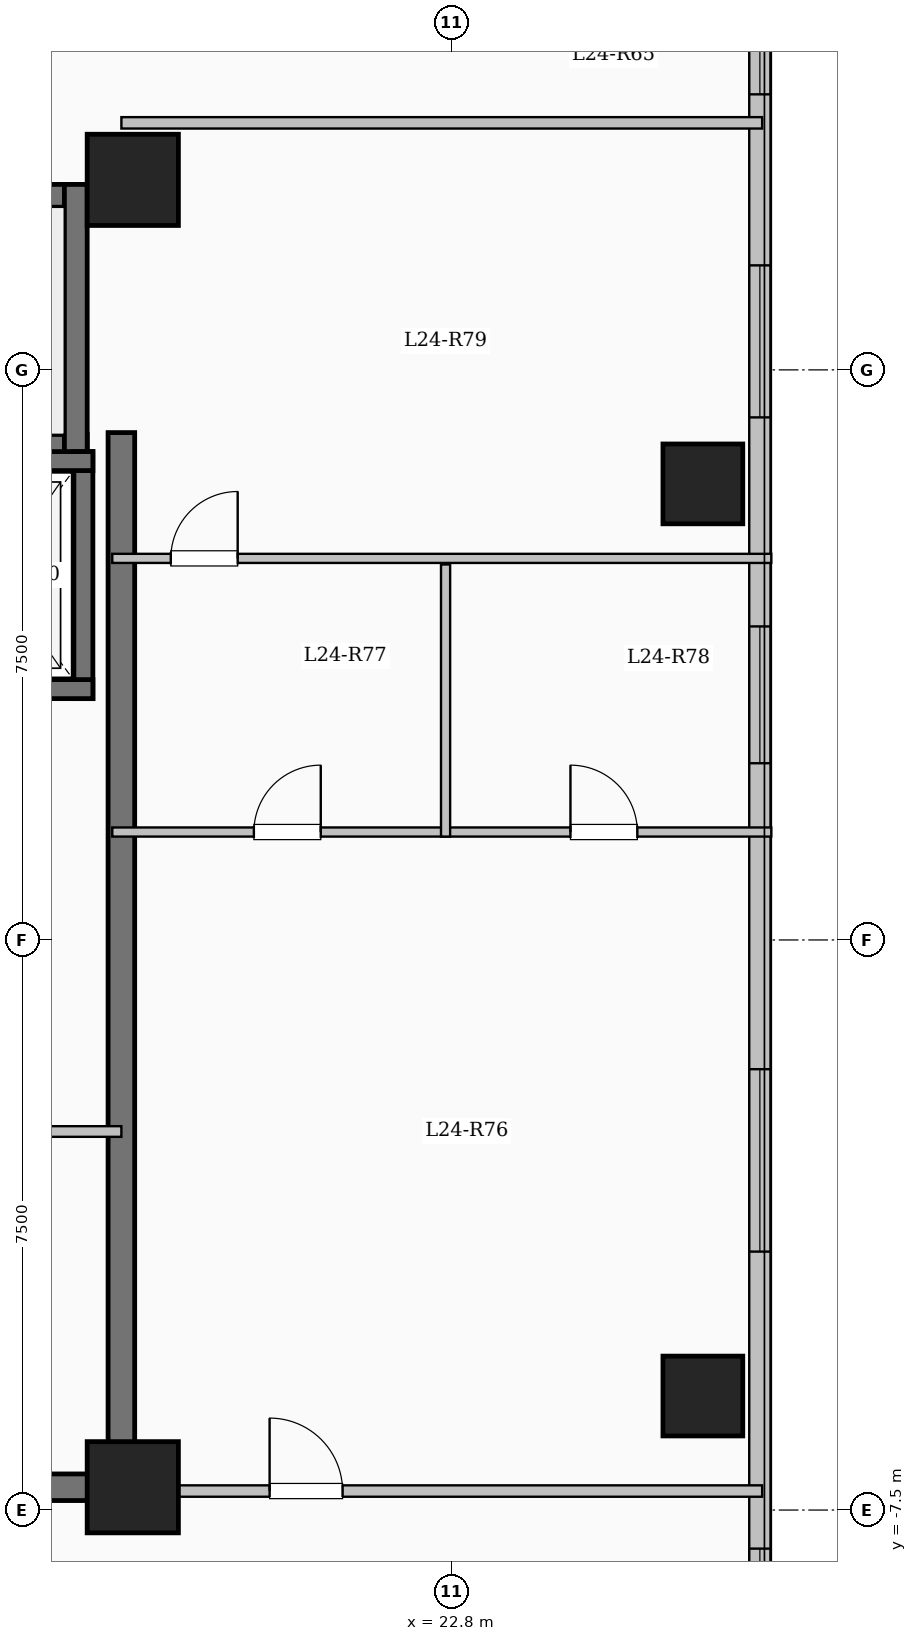
"""IFC4 building model, lengths in metres.
Left out: names, types, materials, properties, quantities, classifications, styles, units other than length and angle.
Written with IfcOpenShell. Run it as: python <this file> out.ifc"""

import sys

from ifc_helpers import new_model, si_unit, direction, frame, frame_2d, origin, origin_2d, place, context, subcontext, project, spatial, rectangle, extrude, element, fill, save


model = new_model("IFC4")
c1 = context("Model", 3, precision=1e-05, world=origin(), true_north=direction((0.0, 1.0)))
c2 = subcontext(c1, "Body", "Model", "MODEL_VIEW")
j1 = project(units=[si_unit("LENGTHUNIT", "METRE"), si_unit("PLANEANGLEUNIT", "RADIAN")], contexts=[c1])
p1 = place(None, origin())
s1 = spatial("IfcSite", under=j1, at=p1, CompositionType="ELEMENT")
p2 = place(p1, origin())
s2 = spatial("IfcBuilding", under=s1, at=p2, CompositionType="ELEMENT")
p3 = place(p2, frame((0.0, 0.0, 91.7)))
s3 = spatial("IfcBuildingStorey", under=s2, at=p3, CompositionType="ELEMENT", Elevation=91.7)
for number, where, z_axis, x_axis in (
    (1, (18.6, -7.2, 0.0), (0.0, 0.0, 1.0), (1.0, 0.0, 0.0)),
    (2, (18.6, 10.0, 0.0), (0.0, 0.0, 1.0), (1.0, 0.0, 0.0)),
):
    element("IfcColumn", number, at=place(p3, frame(where, z_axis=z_axis, x_axis=x_axis)), inside=s3, PredefinedType="COLUMN", context=c2, shape_type="SweptSolid", body=[
        extrude(rectangle(XDim=1.2, YDim=1.2, at=origin_2d()), origin(), (0.0, 0.0, 1.0), 3.35),
    ])
for number, where, z_axis, x_axis in (
    (3, (26.1, -6.0, 0.0), (0.0, 0.0, 1.0), (1.0, 0.0, 0.0)),
    (4, (26.1, 6.0, 0.0), (0.0, 0.0, 1.0), (1.0, 0.0, 0.0)),
):
    element("IfcColumn", number, at=place(p3, frame(where, z_axis=z_axis, x_axis=x_axis)), inside=s3, PredefinedType="COLUMN", context=c2, shape_type="SweptSolid", body=[
        extrude(rectangle(XDim=1.05, YDim=1.05, at=origin_2d()), origin(), (0.0, 0.0, 1.0), 3.35),
    ])
p4 = place(p3, frame((26.85, 17.85, 0.0), z_axis=(0.0, 0.0, 1.0), x_axis=(0.0, -1.0, 0.0)))
e5 = element("IfcWall", 5, at=p4, inside=s3, PredefinedType="SOLIDWALL", context=c2, shape_type="SweptSolid", body=[
    extrude(rectangle(XDim=35.7, YDim=0.28, at=frame_2d((17.85, 0.0))), origin(), (0.0, 0.0, 1.0), 3.1),
])
p5 = place(p4, frame((1.675, 0.0, 0.9)))
e6 = element("IfcOpeningElement", 6, at=p5, cuts=e5, PredefinedType="OPENING", context=c2, shape_type="SweptSolid", body=[
    extrude(rectangle(XDim=2.0, YDim=1.7, at=frame_2d((1.0, 0.85))), frame((0.0, 0.15, 0.0), z_axis=(0.0, -1.0, 0.0), x_axis=(1.0, 0.0, 0.0)), (0.0, 0.0, 1.0), 0.3),
])
p6 = place(p4, frame((5.725, 0.0, 0.95)))
e7 = element("IfcOpeningElement", 7, at=p6, cuts=e5, PredefinedType="OPENING", context=c2, shape_type="SweptSolid", body=[
    extrude(rectangle(XDim=1.0, YDim=1.5, at=frame_2d((0.5, 0.75))), frame((0.0, 0.15, 0.0), z_axis=(0.0, -1.0, 0.0), x_axis=(1.0, 0.0, 0.0)), (0.0, 0.0, 1.0), 0.3),
])
p7 = place(p4, frame((8.975, 0.0, 0.9)))
e8 = element("IfcOpeningElement", 8, at=p7, cuts=e5, PredefinedType="OPENING", context=c2, shape_type="SweptSolid", body=[
    extrude(rectangle(XDim=2.0, YDim=1.7, at=frame_2d((1.0, 0.85))), frame((0.0, 0.15, 0.0), z_axis=(0.0, -1.0, 0.0), x_axis=(1.0, 0.0, 0.0)), (0.0, 0.0, 1.0), 0.3),
])
p8 = place(p4, frame((13.725, 0.0, 0.9)))
e9 = element("IfcOpeningElement", 9, at=p8, cuts=e5, PredefinedType="OPENING", context=c2, shape_type="SweptSolid", body=[
    extrude(rectangle(XDim=1.8, YDim=1.65, at=frame_2d((0.9, 0.825))), frame((0.0, 0.15, 0.0), z_axis=(0.0, -1.0, 0.0), x_axis=(1.0, 0.0, 0.0)), (0.0, 0.0, 1.0), 0.3),
])
p9 = place(p4, frame((19.55, 0.0, 0.9)))
e10 = element("IfcOpeningElement", 10, at=p9, cuts=e5, PredefinedType="OPENING", context=c2, shape_type="SweptSolid", body=[
    extrude(rectangle(XDim=2.4, YDim=1.8, at=frame_2d((1.2, 0.9))), frame((0.0, 0.15, 0.0), z_axis=(0.0, -1.0, 0.0), x_axis=(1.0, 0.0, 0.0)), (0.0, 0.0, 1.0), 0.3),
])
p10 = place(p4, frame((25.857, 0.0, 0.9)))
e11 = element("IfcOpeningElement", 11, at=p10, cuts=e5, PredefinedType="OPENING", context=c2, shape_type="SweptSolid", body=[
    extrude(rectangle(XDim=1.5, YDim=1.65, at=frame_2d((0.75, 0.825))), frame((0.0, 0.15, 0.0), z_axis=(0.0, -1.0, 0.0), x_axis=(1.0, 0.0, 0.0)), (0.0, 0.0, 1.0), 0.3),
])
p11 = place(p4, frame((30.75, 0.0, 0.9)))
e12 = element("IfcOpeningElement", 12, at=p11, cuts=e5, PredefinedType="OPENING", context=c2, shape_type="SweptSolid", body=[
    extrude(rectangle(XDim=2.4, YDim=1.8, at=frame_2d((1.2, 0.9))), frame((0.0, 0.15, 0.0), z_axis=(0.0, -1.0, 0.0), x_axis=(1.0, 0.0, 0.0)), (0.0, 0.0, 1.0), 0.3),
])
p12 = place(p3, frame((10.0, 9.79, 0.0), z_axis=(0.0, 0.0, 1.0), x_axis=(1.0, 0.0, 0.0)))
e13 = element("IfcWall", 13, at=p12, inside=s3, PredefinedType="SHEAR", context=c2, shape_type="SweptSolid", body=[
    extrude(rectangle(XDim=8.0, YDim=0.3, at=frame_2d((4.0, 0.0))), origin(), (0.0, 0.0, 1.0), 3.35),
])
p13 = place(p3, frame((10.0, 6.5, 0.0), z_axis=(0.0, 0.0, 1.0), x_axis=(1.0, 0.0, 0.0)))
e14 = element("IfcWall", 14, at=p13, inside=s3, PredefinedType="SHEAR", context=c2, shape_type="SweptSolid", body=[
    extrude(rectangle(XDim=8.0, YDim=0.3, at=frame_2d((4.0, 0.0))), origin(), (0.0, 0.0, 1.0), 3.35),
])
p14 = place(p13, frame((0.55, 0.0, 0.0)))
e15 = element("IfcOpeningElement", 15, at=p14, cuts=e14, PredefinedType="OPENING", context=c2, shape_type="SweptSolid", body=[
    extrude(rectangle(XDim=1.0, YDim=2.15, at=frame_2d((0.5, 1.075))), frame((0.0, 0.16, 0.0), z_axis=(0.0, -1.0, 0.0), x_axis=(1.0, 0.0, 0.0)), (0.0, 0.0, 1.0), 0.32),
])
p15 = place(p3, frame((17.85, 6.35, 0.0), z_axis=(0.0, 0.0, 1.0), x_axis=(0.0, 1.0, 0.0)))
e16 = element("IfcWall", 16, at=p15, inside=s3, PredefinedType="SHEAR", context=c2, shape_type="SweptSolid", body=[
    extrude(rectangle(XDim=3.59, YDim=0.3, at=frame_2d((1.795, 0.0))), origin(), (0.0, 0.0, 1.0), 3.35),
])
p16 = place(p3, frame((17.95, 3.175, 0.0), z_axis=(0.0, 0.0, 1.0), x_axis=(0.0, 1.0, 0.0)))
e17 = element("IfcWall", 17, at=p16, inside=s3, PredefinedType="SHEAR", context=c2, shape_type="SweptSolid", body=[
    extrude(rectangle(XDim=3.25, YDim=0.25, at=frame_2d((1.625, 0.0))), origin(), (0.0, 0.0, 1.0), 3.35),
])
for number, where, z_axis, x_axis in (
    (18, (15.525, 3.3, 0.0), (0.0, 0.0, 1.0), (1.0, 0.0, 0.0)),
    (19, (15.525, 6.3, 0.0), (0.0, 0.0, 1.0), (1.0, 0.0, 0.0)),
):
    element("IfcWall", number, at=place(p3, frame(where, z_axis=z_axis, x_axis=x_axis)), inside=s3, PredefinedType="SHEAR", context=c2, shape_type="SweptSolid", body=[
        extrude(rectangle(XDim=2.55, YDim=0.25, at=frame_2d((1.275, 0.0))), origin(), (0.0, 0.0, 1.0), 3.35),
    ])
p17 = place(p3, frame((18.45, -7.375, 0.0), z_axis=(0.0, 0.0, 1.0), x_axis=(0.0, 1.0, 0.0)))
e20 = element("IfcWall", 20, at=p17, inside=s3, PredefinedType="SHEAR", context=c2, shape_type="SweptSolid", body=[
    extrude(rectangle(XDim=14.05, YDim=0.35, at=frame_2d((7.025, 0.0))), origin(), (0.0, 0.0, 1.0), 3.35),
])
p18 = place(p3, frame((10.075, -7.2, 0.0), z_axis=(0.0, 0.0, 1.0), x_axis=(1.0, 0.0, 0.0)))
e21 = element("IfcWall", 21, at=p18, inside=s3, PredefinedType="SHEAR", context=c2, shape_type="SweptSolid", body=[
    extrude(rectangle(XDim=8.55, YDim=0.35, at=frame_2d((4.275, 0.0))), origin(), (0.0, 0.0, 1.0), 3.35),
])
p19 = place(p3, frame((15.4, -2.52, 0.0), z_axis=(0.0, 0.0, 1.0), x_axis=(1.0, 0.0, 0.0)))
e22 = element("IfcWall", 22, at=p19, inside=s3, PredefinedType="PARTITIONING", context=c2, shape_type="SweptSolid", body=[
    extrude(rectangle(XDim=3.05, YDim=0.14, at=frame_2d((1.525, 0.0))), origin(), (0.0, 0.0, 1.0), 3.1),
])
p20 = place(p19, frame((1.05, 0.0, 0.0)))
e23 = element("IfcOpeningElement", 23, at=p20, cuts=e22, PredefinedType="OPENING", context=c2, shape_type="SweptSolid", body=[
    extrude(rectangle(XDim=0.9, YDim=2.08, at=frame_2d((0.45, 1.04))), frame((0.0, 0.08, 0.0), z_axis=(0.0, -1.0, 0.0), x_axis=(1.0, 0.0, 0.0)), (0.0, 0.0, 1.0), 0.16),
])
p21 = place(p3, frame((18.45, -7.25, 0.0), z_axis=(0.0, 0.0, 1.0), x_axis=(1.0, 0.0, 0.0)))
e24 = element("IfcWall", 24, at=p21, inside=s3, PredefinedType="PARTITIONING", context=c2, shape_type="SweptSolid", body=[
    extrude(rectangle(XDim=8.43, YDim=0.15, at=frame_2d((4.215, 0.0))), origin(), (0.0, 0.0, 1.0), 3.1),
])
p22 = place(p21, frame((1.95, 0.0, 0.0)))
e25 = element("IfcOpeningElement", 25, at=p22, cuts=e24, PredefinedType="OPENING", context=c2, shape_type="SweptSolid", body=[
    extrude(rectangle(XDim=0.96, YDim=2.15, at=frame_2d((0.48, 1.075))), frame((0.0, 0.085, 0.0), z_axis=(0.0, -1.0, 0.0), x_axis=(1.0, 0.0, 0.0)), (0.0, 0.0, 1.0), 0.17),
])
p23 = place(p3, frame((18.45, 10.75, 0.0), z_axis=(0.0, 0.0, 1.0), x_axis=(1.0, 0.0, 0.0)))
e26 = element("IfcWall", 26, at=p23, inside=s3, PredefinedType="PARTITIONING", context=c2, shape_type="SweptSolid", body=[
    extrude(rectangle(XDim=8.43, YDim=0.15, at=frame_2d((4.215, 0.0))), origin(), (0.0, 0.0, 1.0), 3.1),
])
p24 = place(p3, frame((18.33, 1.42, 0.0), z_axis=(0.0, 0.0, 1.0), x_axis=(1.0, 0.0, 0.0)))
e27 = element("IfcWall", 27, at=p24, inside=s3, PredefinedType="PARTITIONING", context=c2, shape_type="SweptSolid", body=[
    extrude(rectangle(XDim=8.67, YDim=0.12, at=frame_2d((4.335, 0.0))), origin(), (0.0, 0.0, 1.0), 3.1),
])
p25 = place(p24, frame((1.863, 0.0, 0.0)))
e28 = element("IfcOpeningElement", 28, at=p25, cuts=e27, PredefinedType="OPENING", context=c2, shape_type="SweptSolid", body=[
    extrude(rectangle(XDim=0.88, YDim=2.1, at=frame_2d((0.44, 1.05))), frame((0.0, 0.07, 0.0), z_axis=(0.0, -1.0, 0.0), x_axis=(1.0, 0.0, 0.0)), (0.0, 0.0, 1.0), 0.14),
])
p26 = place(p24, frame((6.028, 0.0, 0.0)))
e29 = element("IfcOpeningElement", 29, at=p26, cuts=e27, PredefinedType="OPENING", context=c2, shape_type="SweptSolid", body=[
    extrude(rectangle(XDim=0.88, YDim=2.1, at=frame_2d((0.44, 1.05))), frame((0.0, 0.07, 0.0), z_axis=(0.0, -1.0, 0.0), x_axis=(1.0, 0.0, 0.0)), (0.0, 0.0, 1.0), 0.14),
])
p27 = place(p3, frame((18.33, 5.02, 0.0), z_axis=(0.0, 0.0, 1.0), x_axis=(1.0, 0.0, 0.0)))
e30 = element("IfcWall", 30, at=p27, inside=s3, PredefinedType="PARTITIONING", context=c2, shape_type="SweptSolid", body=[
    extrude(rectangle(XDim=8.67, YDim=0.12, at=frame_2d((4.335, 0.0))), origin(), (0.0, 0.0, 1.0), 3.1),
])
p28 = place(p27, frame((0.77, 0.0, 0.0)))
e31 = element("IfcOpeningElement", 31, at=p28, cuts=e30, PredefinedType="OPENING", context=c2, shape_type="SweptSolid", body=[
    extrude(rectangle(XDim=0.88, YDim=2.1, at=frame_2d((0.44, 1.05))), frame((0.0, 0.07, 0.0), z_axis=(0.0, -1.0, 0.0), x_axis=(1.0, 0.0, 0.0)), (0.0, 0.0, 1.0), 0.14),
])
p29 = place(p3, frame((22.715, 1.36, 0.0), z_axis=(0.0, 0.0, 1.0), x_axis=(0.0, 1.0, 0.0)))
e32 = element("IfcWall", 32, at=p29, inside=s3, PredefinedType="PARTITIONING", context=c2, shape_type="SweptSolid", body=[
    extrude(rectangle(XDim=3.58, YDim=0.12, at=frame_2d((1.79, 0.0))), origin(), (0.0, 0.0, 1.0), 3.1),
])
p30 = place(p6, origin())
e33 = element("IfcWindow", 33, at=p30, inside=s3, PartitioningType="SINGLE_PANEL", PredefinedType="WINDOW", context=c2, shape_type="SweptSolid", body=[
    extrude(rectangle(XDim=1.0, YDim=1.5, at=frame_2d((0.5, 0.75))), frame((0.0, 0.03, 0.0), z_axis=(0.0, -1.0, 0.0), x_axis=(1.0, 0.0, 0.0)), (0.0, 0.0, 1.0), 0.06),
])
fill(e7, e33)
p31 = place(p7, origin())
e34 = element("IfcWindow", 34, at=p31, inside=s3, PartitioningType="SINGLE_PANEL", PredefinedType="WINDOW", context=c2, shape_type="SweptSolid", body=[
    extrude(rectangle(XDim=2.0, YDim=1.7, at=frame_2d((1.0, 0.85))), frame((0.0, 0.03, 0.0), z_axis=(0.0, -1.0, 0.0), x_axis=(1.0, 0.0, 0.0)), (0.0, 0.0, 1.0), 0.06),
])
fill(e8, e34)
p32 = place(p8, origin())
e35 = element("IfcWindow", 35, at=p32, inside=s3, PartitioningType="SINGLE_PANEL", PredefinedType="WINDOW", context=c2, shape_type="SweptSolid", body=[
    extrude(rectangle(XDim=1.8, YDim=1.65, at=frame_2d((0.9, 0.825))), frame((0.0, 0.03, 0.0), z_axis=(0.0, -1.0, 0.0), x_axis=(1.0, 0.0, 0.0)), (0.0, 0.0, 1.0), 0.06),
])
fill(e9, e35)
p33 = place(p9, origin())
e36 = element("IfcWindow", 36, at=p33, inside=s3, PartitioningType="SINGLE_PANEL", PredefinedType="WINDOW", context=c2, shape_type="SweptSolid", body=[
    extrude(rectangle(XDim=2.4, YDim=1.8, at=frame_2d((1.2, 0.9))), frame((0.0, 0.03, 0.0), z_axis=(0.0, -1.0, 0.0), x_axis=(1.0, 0.0, 0.0)), (0.0, 0.0, 1.0), 0.06),
])
fill(e10, e36)
p34 = place(p10, origin())
e37 = element("IfcWindow", 37, at=p34, inside=s3, PartitioningType="SINGLE_PANEL", PredefinedType="WINDOW", context=c2, shape_type="SweptSolid", body=[
    extrude(rectangle(XDim=1.5, YDim=1.65, at=frame_2d((0.75, 0.825))), frame((0.0, 0.03, 0.0), z_axis=(0.0, -1.0, 0.0), x_axis=(1.0, 0.0, 0.0)), (0.0, 0.0, 1.0), 0.06),
])
fill(e11, e37)
p35 = place(p22, origin())
e38 = element("IfcDoor", 38, at=p35, inside=s3, OperationType="SINGLE_SWING_LEFT", PredefinedType="DOOR", context=c2, shape_type="SweptSolid", body=[
    extrude(rectangle(XDim=0.96, YDim=2.15, at=frame_2d((0.48, 1.075))), frame((0.0, 0.025, 0.0), z_axis=(0.0, -1.0, 0.0), x_axis=(1.0, 0.0, 0.0)), (0.0, 0.0, 1.0), 0.05),
])
fill(e25, e38)
p36 = place(p25, origin())
e39 = element("IfcDoor", 39, at=p36, inside=s3, OperationType="SINGLE_SWING_RIGHT", PredefinedType="DOOR", context=c2, shape_type="SweptSolid", body=[
    extrude(rectangle(XDim=0.88, YDim=2.1, at=frame_2d((0.44, 1.05))), frame((0.0, 0.025, 0.0), z_axis=(0.0, -1.0, 0.0), x_axis=(1.0, 0.0, 0.0)), (0.0, 0.0, 1.0), 0.05),
])
fill(e28, e39)
p37 = place(p26, origin())
e40 = element("IfcDoor", 40, at=p37, inside=s3, OperationType="SINGLE_SWING_LEFT", PredefinedType="DOOR", context=c2, shape_type="SweptSolid", body=[
    extrude(rectangle(XDim=0.88, YDim=2.1, at=frame_2d((0.44, 1.05))), frame((0.0, 0.025, 0.0), z_axis=(0.0, -1.0, 0.0), x_axis=(1.0, 0.0, 0.0)), (0.0, 0.0, 1.0), 0.05),
])
fill(e29, e40)
p38 = place(p28, origin())
e41 = element("IfcDoor", 41, at=p38, inside=s3, OperationType="SINGLE_SWING_RIGHT", PredefinedType="DOOR", context=c2, shape_type="SweptSolid", body=[
    extrude(rectangle(XDim=0.88, YDim=2.1, at=frame_2d((0.44, 1.05))), frame((0.0, 0.025, 0.0), z_axis=(0.0, -1.0, 0.0), x_axis=(1.0, 0.0, 0.0)), (0.0, 0.0, 1.0), 0.05),
])
fill(e31, e41)
save(model, sys.argv[1])
